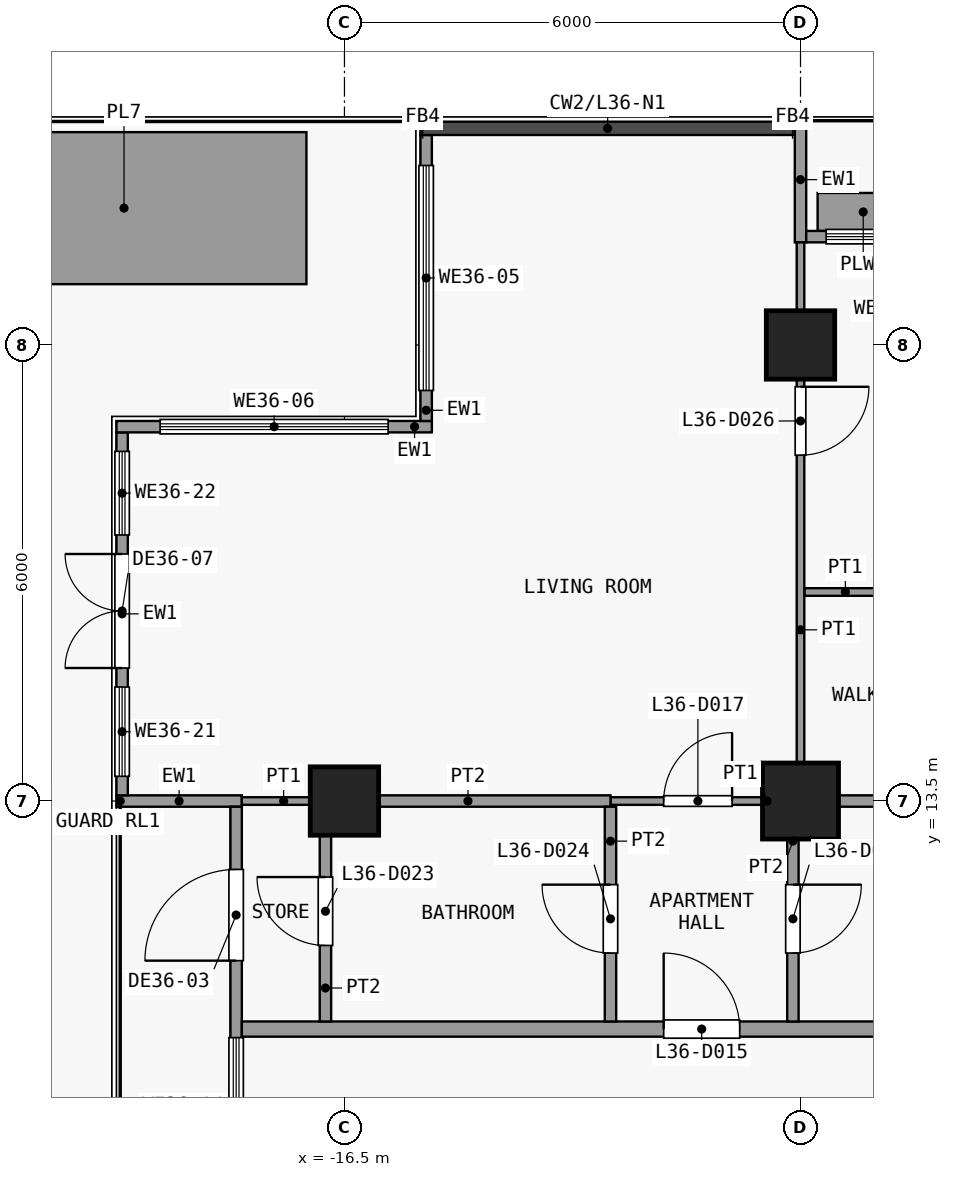
"""IFC4 building model, lengths in metres.
Left out: names, types, materials, properties, quantities, classifications, styles, units other than length and angle.
Written with IfcOpenShell. Run it as: python <this file> out.ifc"""

import sys

from ifc_helpers import new_model, si_unit, direction, frame, frame_2d, origin, origin_2d, place, context, subcontext, project, spatial, rectangle, extrude, element, fill, save


model = new_model("IFC4")
c1 = context("Model", 3, precision=1e-05, world=origin(), true_north=direction((0.0, 1.0)))
c2 = subcontext(c1, "Body", "Model", "MODEL_VIEW")
j1 = project(units=[si_unit("LENGTHUNIT", "METRE"), si_unit("PLANEANGLEUNIT", "RADIAN")], contexts=[c1])
p1 = place(None, origin())
s1 = spatial("IfcSite", under=j1, at=p1, CompositionType="ELEMENT")
p2 = place(p1, origin())
s2 = spatial("IfcBuilding", under=s1, at=p2, CompositionType="ELEMENT")
p3 = place(p2, frame((0.0, 0.0, 149.3)))
s3 = spatial("IfcBuildingStorey", under=s2, at=p3, CompositionType="ELEMENT", Elevation=149.3)
p4 = place(p3, frame((-16.5, 13.5, 0.0), z_axis=(0.0, 0.0, 1.0), x_axis=(1.0, 0.0, 0.0)))
e1 = element("IfcColumn", 1, at=p4, inside=s3, PredefinedType="COLUMN", context=c2, shape_type="SweptSolid", body=[
    extrude(rectangle(XDim=0.9, YDim=0.9, at=origin_2d()), origin(), (0.0, 0.0, 1.0), 3.6),
])
p5 = place(p3, frame((-10.5, 13.5, 0.0), z_axis=(0.0, 0.0, 1.0), x_axis=(1.0, 0.0, 0.0)))
e2 = element("IfcColumn", 2, at=p5, inside=s3, PredefinedType="COLUMN", context=c2, shape_type="SweptSolid", body=[
    extrude(rectangle(XDim=1.0, YDim=1.0, at=origin_2d()), origin(), (0.0, 0.0, 1.0), 3.6),
])
p6 = place(p3, frame((-10.5, 19.5, 0.0), z_axis=(0.0, 0.0, 1.0), x_axis=(1.0, 0.0, 0.0)))
e3 = element("IfcColumn", 3, at=p6, inside=s3, PredefinedType="COLUMN", context=c2, shape_type="SweptSolid", body=[
    extrude(rectangle(XDim=0.9, YDim=0.9, at=origin_2d()), origin(), (0.0, 0.0, 1.0), 3.6),
])
p7 = place(p3, frame((-15.425, 18.5, 0.0), z_axis=(0.0, 0.0, 1.0), x_axis=(0.0, 1.0, 0.0)))
e4 = element("IfcWall", 4, at=p7, inside=s3, PredefinedType="SOLIDWALL", context=c2, shape_type="SweptSolid", body=[
    extrude(rectangle(XDim=3.762, YDim=0.15, at=frame_2d((1.881, 0.0))), origin(), (0.0, 0.0, 1.0), 3.3),
])
p8 = place(p7, frame((0.401, 0.0, 0.9)))
e5 = element("IfcOpeningElement", 5, at=p8, cuts=e4, PredefinedType="OPENING", context=c2, shape_type="SweptSolid", body=[
    extrude(rectangle(XDim=2.96, YDim=2.4, at=frame_2d((1.48, 1.2))), frame((0.0, 0.085, 0.0), z_axis=(0.0, -1.0, 0.0), x_axis=(1.0, 0.0, 0.0)), (0.0, 0.0, 1.0), 0.17),
])
p9 = place(p3, frame((-19.5, 18.425, 0.0), z_axis=(0.0, 0.0, 1.0), x_axis=(1.0, 0.0, 0.0)))
e6 = element("IfcWall", 6, at=p9, inside=s3, PredefinedType="SOLIDWALL", context=c2, shape_type="SweptSolid", body=[
    extrude(rectangle(XDim=4.15, YDim=0.15, at=frame_2d((2.075, 0.0))), origin(), (0.0, 0.0, 1.0), 3.3),
])
p10 = place(p9, frame((0.575, 0.0, 0.9)))
e7 = element("IfcOpeningElement", 7, at=p10, cuts=e6, PredefinedType="OPENING", context=c2, shape_type="SweptSolid", body=[
    extrude(rectangle(XDim=3.0, YDim=2.4, at=frame_2d((1.5, 1.2))), frame((0.0, 0.085, 0.0), z_axis=(0.0, -1.0, 0.0), x_axis=(1.0, 0.0, 0.0)), (0.0, 0.0, 1.0), 0.17),
])
p11 = place(p3, frame((-10.5, 20.85, 0.0), z_axis=(0.0, 0.0, 1.0), x_axis=(0.0, 1.0, 0.0)))
e8 = element("IfcWall", 8, at=p11, inside=s3, PredefinedType="SOLIDWALL", context=c2, shape_type="SweptSolid", body=[
    extrude(rectangle(XDim=1.65, YDim=0.15, at=frame_2d((0.825, 0.0))), origin(), (0.0, 0.0, 1.0), 3.3),
])
p12 = place(p3, frame((-10.425, 20.925, 0.0), z_axis=(0.0, 0.0, 1.0), x_axis=(1.0, 0.0, 0.0)))
e9 = element("IfcWall", 9, at=p12, inside=s3, PredefinedType="SOLIDWALL", context=c2, shape_type="SweptSolid", body=[
    extrude(rectangle(XDim=5.85, YDim=0.15, at=frame_2d((2.925, 0.0))), origin(), (0.0, 0.0, 1.0), 3.3),
])
p13 = place(p12, frame((2.325, 0.0, 0.0)))
e10 = element("IfcOpeningElement", 10, at=p13, cuts=e9, PredefinedType="OPENING", context=c2, shape_type="SweptSolid", body=[
    extrude(rectangle(XDim=1.2, YDim=2.4, at=frame_2d((0.6, 1.2))), frame((0.0, 0.085, 0.0), z_axis=(0.0, -1.0, 0.0), x_axis=(1.0, 0.0, 0.0)), (0.0, 0.0, 1.0), 0.17),
])
p14 = place(p12, frame((0.262, 0.0, 0.9)))
e11 = element("IfcOpeningElement", 11, at=p14, cuts=e9, PredefinedType="OPENING", context=c2, shape_type="SweptSolid", body=[
    extrude(rectangle(XDim=1.8, YDim=2.1, at=frame_2d((0.9, 1.05))), frame((0.0, 0.085, 0.0), z_axis=(0.0, -1.0, 0.0), x_axis=(1.0, 0.0, 0.0)), (0.0, 0.0, 1.0), 0.17),
])
p15 = place(p12, frame((3.788, 0.0, 0.9)))
e12 = element("IfcOpeningElement", 12, at=p15, cuts=e9, PredefinedType="OPENING", context=c2, shape_type="SweptSolid", body=[
    extrude(rectangle(XDim=1.8, YDim=2.1, at=frame_2d((0.9, 1.05))), frame((0.0, 0.085, 0.0), z_axis=(0.0, -1.0, 0.0), x_axis=(1.0, 0.0, 0.0)), (0.0, 0.0, 1.0), 0.17),
])
p16 = place(p3, frame((-10.275, 21.25, 0.0), z_axis=(0.0, 0.0, 1.0), x_axis=(1.0, 0.0, 0.0)))
e13 = element("IfcWall", 13, at=p16, inside=s3, PredefinedType="USERDEFINED", context=c2, shape_type="SweptSolid", body=[
    extrude(rectangle(XDim=1.2, YDim=0.5, at=frame_2d((0.6, 0.0))), origin(), (0.0, 0.0, 1.0), 0.9),
])
p17 = place(p3, frame((-17.85, 13.5, 0.0), z_axis=(0.0, 0.0, 1.0), x_axis=(-1.0, 0.0, 0.0)))
e14 = element("IfcWall", 14, at=p17, inside=s3, PredefinedType="SOLIDWALL", context=c2, shape_type="SweptSolid", body=[
    extrude(rectangle(XDim=1.65, YDim=0.15, at=frame_2d((0.825, 0.0))), origin(), (0.0, 0.0, 1.0), 3.3),
])
p18 = place(p3, frame((-17.925, 7.575, 0.0), z_axis=(0.0, 0.0, 1.0), x_axis=(0.0, 1.0, 0.0)))
e15 = element("IfcWall", 15, at=p18, inside=s3, PredefinedType="SOLIDWALL", context=c2, shape_type="SweptSolid", body=[
    extrude(rectangle(XDim=5.85, YDim=0.15, at=frame_2d((2.925, 0.0))), origin(), (0.0, 0.0, 1.0), 3.3),
])
p19 = place(p18, frame((3.825, 0.0, 0.0)))
e16 = element("IfcOpeningElement", 16, at=p19, cuts=e15, PredefinedType="OPENING", context=c2, shape_type="SweptSolid", body=[
    extrude(rectangle(XDim=1.2, YDim=2.4, at=frame_2d((0.6, 1.2))), frame((0.0, 0.085, 0.0), z_axis=(0.0, -1.0, 0.0), x_axis=(1.0, 0.0, 0.0)), (0.0, 0.0, 1.0), 0.17),
])
p20 = place(p18, frame((1.012, 0.0, 0.9)))
e17 = element("IfcOpeningElement", 17, at=p20, cuts=e15, PredefinedType="OPENING", context=c2, shape_type="SweptSolid", body=[
    extrude(rectangle(XDim=1.8, YDim=2.1, at=frame_2d((0.9, 1.05))), frame((0.0, 0.085, 0.0), z_axis=(0.0, -1.0, 0.0), x_axis=(1.0, 0.0, 0.0)), (0.0, 0.0, 1.0), 0.17),
])
p21 = place(p3, frame((-19.425, 13.575, 0.0), z_axis=(0.0, 0.0, 1.0), x_axis=(0.0, 1.0, 0.0)))
e18 = element("IfcWall", 18, at=p21, inside=s3, PredefinedType="SOLIDWALL", context=c2, shape_type="SweptSolid", body=[
    extrude(rectangle(XDim=4.775, YDim=0.15, at=frame_2d((2.388, 0.0))), origin(), (0.0, 0.0, 1.0), 3.3),
])
p22 = place(p21, frame((1.675, 0.0, 0.0)))
e19 = element("IfcOpeningElement", 19, at=p22, cuts=e18, PredefinedType="OPENING", context=c2, shape_type="SweptSolid", body=[
    extrude(rectangle(XDim=1.5, YDim=2.4, at=frame_2d((0.75, 1.2))), frame((0.0, 0.085, 0.0), z_axis=(0.0, -1.0, 0.0), x_axis=(1.0, 0.0, 0.0)), (0.0, 0.0, 1.0), 0.17),
])
p23 = place(p21, frame((0.25, 0.0, 0.9)))
e20 = element("IfcOpeningElement", 20, at=p23, cuts=e18, PredefinedType="OPENING", context=c2, shape_type="SweptSolid", body=[
    extrude(rectangle(XDim=1.175, YDim=2.1, at=frame_2d((0.587, 1.05))), frame((0.0, 0.085, 0.0), z_axis=(0.0, -1.0, 0.0), x_axis=(1.0, 0.0, 0.0)), (0.0, 0.0, 1.0), 0.17),
])
p24 = place(p21, frame((3.425, 0.0, 0.9)))
e21 = element("IfcOpeningElement", 21, at=p24, cuts=e18, PredefinedType="OPENING", context=c2, shape_type="SweptSolid", body=[
    extrude(rectangle(XDim=1.1, YDim=2.1, at=frame_2d((0.55, 1.05))), frame((0.0, 0.085, 0.0), z_axis=(0.0, -1.0, 0.0), x_axis=(1.0, 0.0, 0.0)), (0.0, 0.0, 1.0), 0.17),
])
p25 = place(p3, frame((-21.8, 21.3, 0.0), z_axis=(0.0, 0.0, 1.0), x_axis=(1.0, 0.0, 0.0)))
e22 = element("IfcWall", 22, at=p25, inside=s3, PredefinedType="USERDEFINED", context=c2, shape_type="SweptSolid", body=[
    extrude(rectangle(XDim=4.8, YDim=2.0, at=frame_2d((2.4, 0.0))), origin(), (0.0, 0.0, 1.0), 0.9),
])
p26 = place(p3, frame((-17.85, 10.5, 0.0), z_axis=(0.0, 0.0, 1.0), x_axis=(1.0, 0.0, 0.0)))
e23 = element("IfcWall", 23, at=p26, inside=s3, PredefinedType="PARTITIONING", context=c2, shape_type="SweptSolid", body=[
    extrude(rectangle(XDim=37.2, YDim=0.2, at=frame_2d((18.6, 0.0))), origin(), (0.0, 0.0, 1.0), 3.3),
])
p27 = place(p26, frame((5.55, 0.0, 0.0)))
e24 = element("IfcOpeningElement", 24, at=p27, cuts=e23, PredefinedType="OPENING", context=c2, shape_type="SweptSolid", body=[
    extrude(rectangle(XDim=1.0, YDim=2.1, at=frame_2d((0.5, 1.05))), frame((0.0, 0.11, 0.0), z_axis=(0.0, -1.0, 0.0), x_axis=(1.0, 0.0, 0.0)), (0.0, 0.0, 1.0), 0.22),
])
p28 = place(p26, frame((23.05, 0.0, 0.0)))
e25 = element("IfcOpeningElement", 25, at=p28, cuts=e23, PredefinedType="OPENING", context=c2, shape_type="SweptSolid", body=[
    extrude(rectangle(XDim=1.0, YDim=2.1, at=frame_2d((0.5, 1.05))), frame((0.0, 0.11, 0.0), z_axis=(0.0, -1.0, 0.0), x_axis=(1.0, 0.0, 0.0)), (0.0, 0.0, 1.0), 0.22),
])
p29 = place(p3, frame((-17.85, 13.5, 0.0), z_axis=(0.0, 0.0, 1.0), x_axis=(1.0, 0.0, 0.0)))
e26 = element("IfcWall", 26, at=p29, inside=s3, PredefinedType="PARTITIONING", context=c2, shape_type="SweptSolid", body=[
    extrude(rectangle(XDim=1.1, YDim=0.1, at=frame_2d((0.55, 0.0))), origin(), (0.0, 0.0, 1.0), 3.3),
])
p30 = place(p3, frame((-13.0, 13.5, 0.0), z_axis=(0.0, 0.0, 1.0), x_axis=(1.0, 0.0, 0.0)))
e27 = element("IfcWall", 27, at=p30, inside=s3, PredefinedType="PARTITIONING", context=c2, shape_type="SweptSolid", body=[
    extrude(rectangle(XDim=2.4, YDim=0.1, at=frame_2d((1.2, 0.0))), origin(), (0.0, 0.0, 1.0), 3.3),
])
p31 = place(p30, frame((0.7, 0.0, 0.0)))
e28 = element("IfcOpeningElement", 28, at=p31, cuts=e27, PredefinedType="OPENING", context=c2, shape_type="SweptSolid", body=[
    extrude(rectangle(XDim=0.9, YDim=2.1, at=frame_2d((0.45, 1.05))), frame((0.0, 0.06, 0.0), z_axis=(0.0, -1.0, 0.0), x_axis=(1.0, 0.0, 0.0)), (0.0, 0.0, 1.0), 0.12),
])
p32 = place(p3, frame((-16.75, 13.5, 0.0), z_axis=(0.0, 0.0, 1.0), x_axis=(1.0, 0.0, 0.0)))
e29 = element("IfcWall", 29, at=p32, inside=s3, PredefinedType="PARTITIONING", context=c2, shape_type="SweptSolid", body=[
    extrude(rectangle(XDim=3.75, YDim=0.15, at=frame_2d((1.875, 0.0))), origin(), (0.0, 0.0, 1.0), 3.3),
])
p33 = place(p3, frame((-10.5, 13.5, 0.0), z_axis=(0.0, 0.0, 1.0), x_axis=(1.0, 0.0, 0.0)))
e30 = element("IfcWall", 30, at=p33, inside=s3, PredefinedType="PARTITIONING", context=c2, shape_type="SweptSolid", body=[
    extrude(rectangle(XDim=6.0, YDim=0.15, at=frame_2d((3.0, 0.0))), origin(), (0.0, 0.0, 1.0), 3.3),
])
p34 = place(p3, frame((-10.45, 16.25, 0.0), z_axis=(0.0, 0.0, 1.0), x_axis=(1.0, 0.0, 0.0)))
e31 = element("IfcWall", 31, at=p34, inside=s3, PredefinedType="PARTITIONING", context=c2, shape_type="SweptSolid", body=[
    extrude(rectangle(XDim=3.25, YDim=0.1, at=frame_2d((1.625, 0.0))), origin(), (0.0, 0.0, 1.0), 3.3),
])
p35 = place(p34, frame((1.2, 0.0, 0.0)))
e32 = element("IfcOpeningElement", 32, at=p35, cuts=e31, PredefinedType="OPENING", context=c2, shape_type="SweptSolid", body=[
    extrude(rectangle(XDim=0.9, YDim=2.1, at=frame_2d((0.45, 1.05))), frame((0.0, 0.06, 0.0), z_axis=(0.0, -1.0, 0.0), x_axis=(1.0, 0.0, 0.0)), (0.0, 0.0, 1.0), 0.12),
])
p36 = place(p3, frame((-16.75, 10.6, 0.0), z_axis=(0.0, 0.0, 1.0), x_axis=(0.0, 1.0, 0.0)))
e33 = element("IfcWall", 33, at=p36, inside=s3, PredefinedType="PARTITIONING", context=c2, shape_type="SweptSolid", body=[
    extrude(rectangle(XDim=2.825, YDim=0.15, at=frame_2d((1.413, 0.0))), origin(), (0.0, 0.0, 1.0), 3.3),
])
p37 = place(p36, frame((1.0, 0.0, 0.0)))
e34 = element("IfcOpeningElement", 34, at=p37, cuts=e33, PredefinedType="OPENING", context=c2, shape_type="SweptSolid", body=[
    extrude(rectangle(XDim=0.9, YDim=2.1, at=frame_2d((0.45, 1.05))), frame((0.0, 0.085, 0.0), z_axis=(0.0, -1.0, 0.0), x_axis=(1.0, 0.0, 0.0)), (0.0, 0.0, 1.0), 0.17),
])
p38 = place(p3, frame((-13.0, 10.6, 0.0), z_axis=(0.0, 0.0, 1.0), x_axis=(0.0, 1.0, 0.0)))
e35 = element("IfcWall", 35, at=p38, inside=s3, PredefinedType="PARTITIONING", context=c2, shape_type="SweptSolid", body=[
    extrude(rectangle(XDim=2.825, YDim=0.15, at=frame_2d((1.413, 0.0))), origin(), (0.0, 0.0, 1.0), 3.3),
])
p39 = place(p38, frame((0.9, 0.0, 0.0)))
e36 = element("IfcOpeningElement", 36, at=p39, cuts=e35, PredefinedType="OPENING", context=c2, shape_type="SweptSolid", body=[
    extrude(rectangle(XDim=0.9, YDim=2.1, at=frame_2d((0.45, 1.05))), frame((0.0, 0.085, 0.0), z_axis=(0.0, -1.0, 0.0), x_axis=(1.0, 0.0, 0.0)), (0.0, 0.0, 1.0), 0.17),
])
p40 = place(p3, frame((-10.6, 10.6, 0.0), z_axis=(0.0, 0.0, 1.0), x_axis=(0.0, 1.0, 0.0)))
e37 = element("IfcWall", 37, at=p40, inside=s3, PredefinedType="PARTITIONING", context=c2, shape_type="SweptSolid", body=[
    extrude(rectangle(XDim=2.825, YDim=0.15, at=frame_2d((1.413, 0.0))), origin(), (0.0, 0.0, 1.0), 3.3),
])
p41 = place(p40, frame((0.9, 0.0, 0.0)))
e38 = element("IfcOpeningElement", 38, at=p41, cuts=e37, PredefinedType="OPENING", context=c2, shape_type="SweptSolid", body=[
    extrude(rectangle(XDim=0.9, YDim=2.1, at=frame_2d((0.45, 1.05))), frame((0.0, 0.085, 0.0), z_axis=(0.0, -1.0, 0.0), x_axis=(1.0, 0.0, 0.0)), (0.0, 0.0, 1.0), 0.17),
])
p42 = place(p3, frame((-10.5, 13.575, 0.0), z_axis=(0.0, 0.0, 1.0), x_axis=(0.0, 1.0, 0.0)))
e39 = element("IfcWall", 39, at=p42, inside=s3, PredefinedType="PARTITIONING", context=c2, shape_type="SweptSolid", body=[
    extrude(rectangle(XDim=7.275, YDim=0.1, at=frame_2d((3.638, 0.0))), origin(), (0.0, 0.0, 1.0), 3.3),
])
p43 = place(p42, frame((4.475, 0.0, 0.0)))
e40 = element("IfcOpeningElement", 40, at=p43, cuts=e39, PredefinedType="OPENING", context=c2, shape_type="SweptSolid", body=[
    extrude(rectangle(XDim=0.9, YDim=2.1, at=frame_2d((0.45, 1.05))), frame((0.0, 0.06, 0.0), z_axis=(0.0, -1.0, 0.0), x_axis=(1.0, 0.0, 0.0)), (0.0, 0.0, 1.0), 0.12),
])
p44 = place(p8, origin())
e41 = element("IfcWindow", 41, at=p44, inside=s3, PartitioningType="SINGLE_PANEL", PredefinedType="WINDOW", context=c2, shape_type="SweptSolid", body=[
    extrude(rectangle(XDim=2.96, YDim=2.4, at=frame_2d((1.48, 1.2))), frame((0.0, 0.03, 0.0), z_axis=(0.0, -1.0, 0.0), x_axis=(1.0, 0.0, 0.0)), (0.0, 0.0, 1.0), 0.06),
])
fill(e5, e41)
p45 = place(p10, origin())
e42 = element("IfcWindow", 42, at=p45, inside=s3, PartitioningType="SINGLE_PANEL", PredefinedType="WINDOW", context=c2, shape_type="SweptSolid", body=[
    extrude(rectangle(XDim=3.0, YDim=2.4, at=frame_2d((1.5, 1.2))), frame((0.0, 0.03, 0.0), z_axis=(0.0, -1.0, 0.0), x_axis=(1.0, 0.0, 0.0)), (0.0, 0.0, 1.0), 0.06),
])
fill(e7, e42)
p46 = place(p14, origin())
e43 = element("IfcWindow", 43, at=p46, inside=s3, PartitioningType="SINGLE_PANEL", PredefinedType="WINDOW", context=c2, shape_type="SweptSolid", body=[
    extrude(rectangle(XDim=1.8, YDim=2.1, at=frame_2d((0.9, 1.05))), frame((0.0, 0.03, 0.0), z_axis=(0.0, -1.0, 0.0), x_axis=(1.0, 0.0, 0.0)), (0.0, 0.0, 1.0), 0.06),
])
fill(e11, e43)
p47 = place(p19, origin())
e44 = element("IfcDoor", 44, at=p47, inside=s3, OperationType="SINGLE_SWING_LEFT", PredefinedType="DOOR", context=c2, shape_type="SweptSolid", body=[
    extrude(rectangle(XDim=1.2, YDim=2.4, at=frame_2d((0.6, 1.2))), frame((0.0, 0.025, 0.0), z_axis=(0.0, -1.0, 0.0), x_axis=(1.0, 0.0, 0.0)), (0.0, 0.0, 1.0), 0.05),
])
fill(e16, e44)
p48 = place(p20, origin())
e45 = element("IfcWindow", 45, at=p48, inside=s3, PartitioningType="SINGLE_PANEL", PredefinedType="WINDOW", context=c2, shape_type="SweptSolid", body=[
    extrude(rectangle(XDim=1.8, YDim=2.1, at=frame_2d((0.9, 1.05))), frame((0.0, 0.03, 0.0), z_axis=(0.0, -1.0, 0.0), x_axis=(1.0, 0.0, 0.0)), (0.0, 0.0, 1.0), 0.06),
])
fill(e17, e45)
p49 = place(p22, origin())
e46 = element("IfcDoor", 46, at=p49, inside=s3, OperationType="DOUBLE_DOOR_SINGLE_SWING", PredefinedType="DOOR", context=c2, shape_type="SweptSolid", body=[
    extrude(rectangle(XDim=1.5, YDim=2.4, at=frame_2d((0.75, 1.2))), frame((0.0, 0.025, 0.0), z_axis=(0.0, -1.0, 0.0), x_axis=(1.0, 0.0, 0.0)), (0.0, 0.0, 1.0), 0.05),
])
fill(e19, e46)
p50 = place(p23, origin())
e47 = element("IfcWindow", 47, at=p50, inside=s3, PartitioningType="SINGLE_PANEL", PredefinedType="WINDOW", context=c2, shape_type="SweptSolid", body=[
    extrude(rectangle(XDim=1.175, YDim=2.1, at=frame_2d((0.587, 1.05))), frame((0.0, 0.03, 0.0), z_axis=(0.0, -1.0, 0.0), x_axis=(1.0, 0.0, 0.0)), (0.0, 0.0, 1.0), 0.06),
])
fill(e20, e47)
p51 = place(p24, origin())
e48 = element("IfcWindow", 48, at=p51, inside=s3, PartitioningType="SINGLE_PANEL", PredefinedType="WINDOW", context=c2, shape_type="SweptSolid", body=[
    extrude(rectangle(XDim=1.1, YDim=2.1, at=frame_2d((0.55, 1.05))), frame((0.0, 0.03, 0.0), z_axis=(0.0, -1.0, 0.0), x_axis=(1.0, 0.0, 0.0)), (0.0, 0.0, 1.0), 0.06),
])
fill(e21, e48)
p52 = place(p27, origin())
e49 = element("IfcDoor", 49, at=p52, inside=s3, OperationType="SINGLE_SWING_RIGHT", PredefinedType="DOOR", context=c2, shape_type="SweptSolid", body=[
    extrude(rectangle(XDim=1.0, YDim=2.1, at=frame_2d((0.5, 1.05))), frame((0.0, 0.025, 0.0), z_axis=(0.0, -1.0, 0.0), x_axis=(1.0, 0.0, 0.0)), (0.0, 0.0, 1.0), 0.05),
])
fill(e24, e49)
p53 = place(p31, origin())
e50 = element("IfcDoor", 50, at=p53, inside=s3, OperationType="SINGLE_SWING_LEFT", PredefinedType="DOOR", context=c2, shape_type="SweptSolid", body=[
    extrude(rectangle(XDim=0.9, YDim=2.1, at=frame_2d((0.45, 1.05))), frame((0.0, 0.025, 0.0), z_axis=(0.0, -1.0, 0.0), x_axis=(1.0, 0.0, 0.0)), (0.0, 0.0, 1.0), 0.05),
])
fill(e28, e50)
p54 = place(p37, origin())
e51 = element("IfcDoor", 51, at=p54, inside=s3, OperationType="SINGLE_SWING_LEFT", PredefinedType="DOOR", context=c2, shape_type="SweptSolid", body=[
    extrude(rectangle(XDim=0.9, YDim=2.1, at=frame_2d((0.45, 1.05))), frame((0.0, 0.025, 0.0), z_axis=(0.0, -1.0, 0.0), x_axis=(1.0, 0.0, 0.0)), (0.0, 0.0, 1.0), 0.05),
])
fill(e34, e51)
p55 = place(p39, origin())
e52 = element("IfcDoor", 52, at=p55, inside=s3, OperationType="SINGLE_SWING_LEFT", PredefinedType="DOOR", context=c2, shape_type="SweptSolid", body=[
    extrude(rectangle(XDim=0.9, YDim=2.1, at=frame_2d((0.45, 1.05))), frame((0.0, 0.025, 0.0), z_axis=(0.0, -1.0, 0.0), x_axis=(1.0, 0.0, 0.0)), (0.0, 0.0, 1.0), 0.05),
])
fill(e36, e52)
p56 = place(p41, origin())
e53 = element("IfcDoor", 53, at=p56, inside=s3, OperationType="SINGLE_SWING_RIGHT", PredefinedType="DOOR", context=c2, shape_type="SweptSolid", body=[
    extrude(rectangle(XDim=0.9, YDim=2.1, at=frame_2d((0.45, 1.05))), frame((0.0, 0.025, 0.0), z_axis=(0.0, -1.0, 0.0), x_axis=(1.0, 0.0, 0.0)), (0.0, 0.0, 1.0), 0.05),
])
fill(e38, e53)
p57 = place(p43, origin())
e54 = element("IfcDoor", 54, at=p57, inside=s3, OperationType="SINGLE_SWING_RIGHT", PredefinedType="DOOR", context=c2, shape_type="SweptSolid", body=[
    extrude(rectangle(XDim=0.9, YDim=2.1, at=frame_2d((0.45, 1.05))), frame((0.0, 0.025, 0.0), z_axis=(0.0, -1.0, 0.0), x_axis=(1.0, 0.0, 0.0)), (0.0, 0.0, 1.0), 0.05),
])
fill(e40, e54)
save(model, sys.argv[1])
